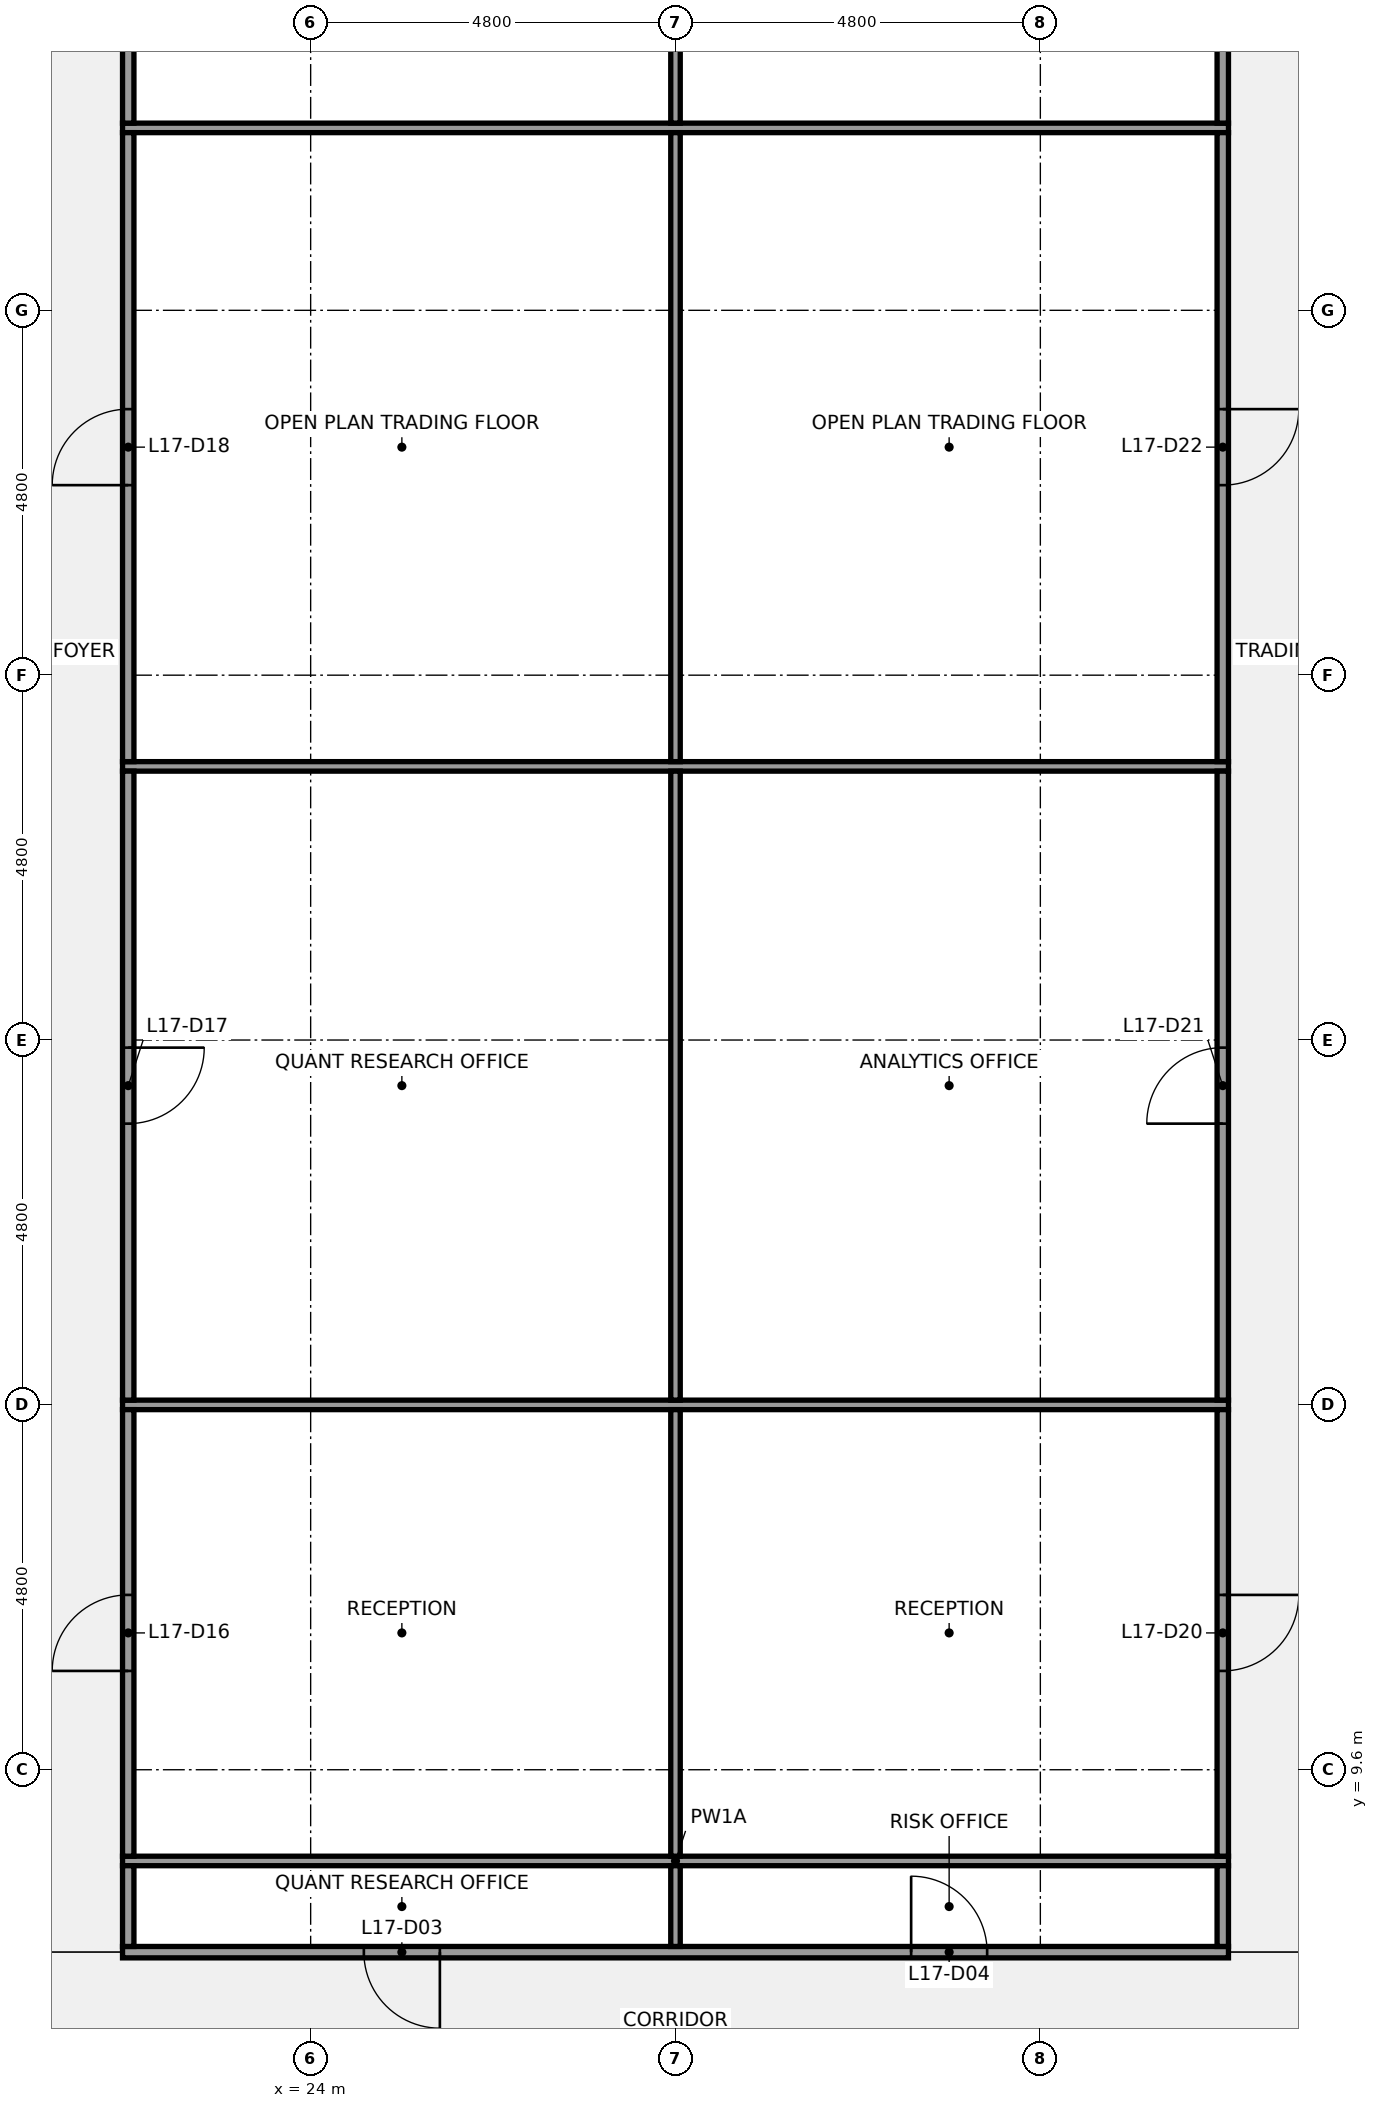
"""IFC4 building model, lengths in metres.
Left out: names, types, materials, properties, quantities, classifications, styles, units other than length and angle.
Written with IfcOpenShell. Run it as: python <this file> out.ifc"""

import sys

from ifc_helpers import new_model, si_unit, direction, frame, frame_2d, origin, place, context, subcontext, project, spatial, rectangle, extrude, element, fill, save


model = new_model("IFC4")
c1 = context("Model", 3, precision=1e-05, world=origin(), true_north=direction((0.0, 1.0)))
c2 = subcontext(c1, "Body", "Model", "MODEL_VIEW")
j1 = project(units=[si_unit("LENGTHUNIT", "METRE"), si_unit("PLANEANGLEUNIT", "RADIAN")], contexts=[c1])
p1 = place(None, origin())
s1 = spatial("IfcSite", under=j1, at=p1, CompositionType="ELEMENT")
p2 = place(p1, origin())
s2 = spatial("IfcBuilding", under=s1, at=p2, CompositionType="ELEMENT")
p3 = place(p2, frame((0.0, 0.0, 79.0)))
s3 = spatial("IfcBuildingStorey", under=s2, at=p3, CompositionType="ELEMENT", Elevation=79.0)
p4 = place(p3, frame((21.525, 7.2, 0.0), z_axis=(0.0, 0.0, 1.0), x_axis=(1.0, 0.0, 0.0)))
e1 = element("IfcWall", 1, at=p4, inside=s3, PredefinedType="PARTITIONING", context=c2, shape_type="SweptSolid", body=[
    extrude(rectangle(XDim=14.55, YDim=0.15, at=frame_2d((7.275, 0.0))), origin(), (0.0, 0.0, 1.0), 2.849),
])
p5 = place(p4, frame((3.175, 0.0, 0.0)))
e2 = element("IfcOpeningElement", 2, at=p5, cuts=e1, PredefinedType="OPENING", context=c2, shape_type="SweptSolid", body=[
    extrude(rectangle(XDim=1.0, YDim=2.1, at=frame_2d((0.5, 1.05))), frame((0.0, 0.085, 0.0), z_axis=(0.0, -1.0, 0.0), x_axis=(1.0, 0.0, 0.0)), (0.0, 0.0, 1.0), 0.17),
])
p6 = place(p4, frame((10.375, 0.0, 0.0)))
e3 = element("IfcOpeningElement", 3, at=p6, cuts=e1, PredefinedType="OPENING", context=c2, shape_type="SweptSolid", body=[
    extrude(rectangle(XDim=1.0, YDim=2.1, at=frame_2d((0.5, 1.05))), frame((0.0, 0.085, 0.0), z_axis=(0.0, -1.0, 0.0), x_axis=(1.0, 0.0, 0.0)), (0.0, 0.0, 1.0), 0.17),
])
for number, where, z_axis, x_axis in (
    (4, (21.525, 8.4, 0.0), (0.0, 0.0, 1.0), (1.0, 0.0, 0.0)),
    (5, (21.525, 14.4, 0.0), (0.0, 0.0, 1.0), (1.0, 0.0, 0.0)),
    (6, (21.525, 22.8, 0.0), (0.0, 0.0, 1.0), (1.0, 0.0, 0.0)),
    (7, (21.525, 31.2, 0.0), (0.0, 0.0, 1.0), (1.0, 0.0, 0.0)),
):
    element("IfcWall", number, at=place(p3, frame(where, z_axis=z_axis, x_axis=x_axis)), inside=s3, PredefinedType="PARTITIONING", context=c2, shape_type="SweptSolid", body=[
        extrude(rectangle(XDim=14.55, YDim=0.125, at=frame_2d((7.275, 0.0))), origin(), (0.0, 0.0, 1.0), 2.849),
    ])
p7 = place(p3, frame((21.6, 7.275, 0.0), z_axis=(0.0, 0.0, 1.0), x_axis=(0.0, 1.0, 0.0)))
e8 = element("IfcWall", 8, at=p7, inside=s3, PredefinedType="PARTITIONING", context=c2, shape_type="SweptSolid", body=[
    extrude(rectangle(XDim=1.062, YDim=0.15, at=frame_2d((0.531, 0.0))), origin(), (0.0, 0.0, 1.0), 2.849),
])
p8 = place(p3, frame((21.6, 8.462, 0.0), z_axis=(0.0, 0.0, 1.0), x_axis=(0.0, 1.0, 0.0)))
e9 = element("IfcWall", 9, at=p8, inside=s3, PredefinedType="PARTITIONING", context=c2, shape_type="SweptSolid", body=[
    extrude(rectangle(XDim=5.875, YDim=0.15, at=frame_2d((2.938, 0.0))), origin(), (0.0, 0.0, 1.0), 2.849),
])
p9 = place(p8, frame((2.438, 0.0, 0.0)))
e10 = element("IfcOpeningElement", 10, at=p9, cuts=e9, PredefinedType="OPENING", context=c2, shape_type="SweptSolid", body=[
    extrude(rectangle(XDim=1.0, YDim=2.1, at=frame_2d((0.5, 1.05))), frame((0.0, 0.085, 0.0), z_axis=(0.0, -1.0, 0.0), x_axis=(1.0, 0.0, 0.0)), (0.0, 0.0, 1.0), 0.17),
])
p10 = place(p3, frame((21.6, 14.462, 0.0), z_axis=(0.0, 0.0, 1.0), x_axis=(0.0, 1.0, 0.0)))
e11 = element("IfcWall", 11, at=p10, inside=s3, PredefinedType="PARTITIONING", context=c2, shape_type="SweptSolid", body=[
    extrude(rectangle(XDim=8.275, YDim=0.15, at=frame_2d((4.138, 0.0))), origin(), (0.0, 0.0, 1.0), 2.849),
])
p11 = place(p10, frame((3.637, 0.0, 0.0)))
e12 = element("IfcOpeningElement", 12, at=p11, cuts=e11, PredefinedType="OPENING", context=c2, shape_type="SweptSolid", body=[
    extrude(rectangle(XDim=1.0, YDim=2.1, at=frame_2d((0.5, 1.05))), frame((0.0, 0.085, 0.0), z_axis=(0.0, -1.0, 0.0), x_axis=(1.0, 0.0, 0.0)), (0.0, 0.0, 1.0), 0.17),
])
p12 = place(p3, frame((21.6, 22.863, 0.0), z_axis=(0.0, 0.0, 1.0), x_axis=(0.0, 1.0, 0.0)))
e13 = element("IfcWall", 13, at=p12, inside=s3, PredefinedType="PARTITIONING", context=c2, shape_type="SweptSolid", body=[
    extrude(rectangle(XDim=8.275, YDim=0.15, at=frame_2d((4.137, 0.0))), origin(), (0.0, 0.0, 1.0), 2.849),
])
p13 = place(p12, frame((3.637, 0.0, 0.0)))
e14 = element("IfcOpeningElement", 14, at=p13, cuts=e13, PredefinedType="OPENING", context=c2, shape_type="SweptSolid", body=[
    extrude(rectangle(XDim=1.0, YDim=2.1, at=frame_2d((0.5, 1.05))), frame((0.0, 0.085, 0.0), z_axis=(0.0, -1.0, 0.0), x_axis=(1.0, 0.0, 0.0)), (0.0, 0.0, 1.0), 0.17),
])
p14 = place(p3, frame((21.6, 31.262, 0.0), z_axis=(0.0, 0.0, 1.0), x_axis=(0.0, 1.0, 0.0)))
e15 = element("IfcWall", 15, at=p14, inside=s3, PredefinedType="PARTITIONING", context=c2, shape_type="SweptSolid", body=[
    extrude(rectangle(XDim=3.475, YDim=0.15, at=frame_2d((1.738, 0.0))), origin(), (0.0, 0.0, 1.0), 2.849),
])
p15 = place(p14, frame((1.238, 0.0, 0.0)))
e16 = element("IfcOpeningElement", 16, at=p15, cuts=e15, PredefinedType="OPENING", context=c2, shape_type="SweptSolid", body=[
    extrude(rectangle(XDim=1.0, YDim=2.1, at=frame_2d((0.5, 1.05))), frame((0.0, 0.085, 0.0), z_axis=(0.0, -1.0, 0.0), x_axis=(1.0, 0.0, 0.0)), (0.0, 0.0, 1.0), 0.17),
])
p16 = place(p3, frame((28.8, 7.275, 0.0), z_axis=(0.0, 0.0, 1.0), x_axis=(0.0, 1.0, 0.0)))
e17 = element("IfcWall", 17, at=p16, inside=s3, PredefinedType="PARTITIONING", context=c2, shape_type="SweptSolid", body=[
    extrude(rectangle(XDim=1.062, YDim=0.125, at=frame_2d((0.531, 0.0))), origin(), (0.0, 0.0, 1.0), 2.849),
])
p17 = place(p3, frame((28.8, 8.462, 0.0), z_axis=(0.0, 0.0, 1.0), x_axis=(0.0, 1.0, 0.0)))
e18 = element("IfcWall", 18, at=p17, inside=s3, PredefinedType="PARTITIONING", context=c2, shape_type="SweptSolid", body=[
    extrude(rectangle(XDim=5.875, YDim=0.125, at=frame_2d((2.938, 0.0))), origin(), (0.0, 0.0, 1.0), 2.849),
])
p18 = place(p3, frame((28.8, 14.462, 0.0), z_axis=(0.0, 0.0, 1.0), x_axis=(0.0, 1.0, 0.0)))
e19 = element("IfcWall", 19, at=p18, inside=s3, PredefinedType="PARTITIONING", context=c2, shape_type="SweptSolid", body=[
    extrude(rectangle(XDim=8.275, YDim=0.125, at=frame_2d((4.138, 0.0))), origin(), (0.0, 0.0, 1.0), 2.849),
])
p19 = place(p3, frame((28.8, 22.863, 0.0), z_axis=(0.0, 0.0, 1.0), x_axis=(0.0, 1.0, 0.0)))
e20 = element("IfcWall", 20, at=p19, inside=s3, PredefinedType="PARTITIONING", context=c2, shape_type="SweptSolid", body=[
    extrude(rectangle(XDim=8.275, YDim=0.125, at=frame_2d((4.137, 0.0))), origin(), (0.0, 0.0, 1.0), 2.849),
])
p20 = place(p3, frame((28.8, 31.262, 0.0), z_axis=(0.0, 0.0, 1.0), x_axis=(0.0, 1.0, 0.0)))
e21 = element("IfcWall", 21, at=p20, inside=s3, PredefinedType="PARTITIONING", context=c2, shape_type="SweptSolid", body=[
    extrude(rectangle(XDim=3.475, YDim=0.125, at=frame_2d((1.738, 0.0))), origin(), (0.0, 0.0, 1.0), 2.849),
])
p21 = place(p3, frame((36.0, 7.275, 0.0), z_axis=(0.0, 0.0, 1.0), x_axis=(0.0, 1.0, 0.0)))
e22 = element("IfcWall", 22, at=p21, inside=s3, PredefinedType="PARTITIONING", context=c2, shape_type="SweptSolid", body=[
    extrude(rectangle(XDim=1.062, YDim=0.15, at=frame_2d((0.531, 0.0))), origin(), (0.0, 0.0, 1.0), 2.849),
])
p22 = place(p3, frame((36.0, 8.462, 0.0), z_axis=(0.0, 0.0, 1.0), x_axis=(0.0, 1.0, 0.0)))
e23 = element("IfcWall", 23, at=p22, inside=s3, PredefinedType="PARTITIONING", context=c2, shape_type="SweptSolid", body=[
    extrude(rectangle(XDim=5.875, YDim=0.15, at=frame_2d((2.938, 0.0))), origin(), (0.0, 0.0, 1.0), 2.849),
])
p23 = place(p22, frame((2.438, 0.0, 0.0)))
e24 = element("IfcOpeningElement", 24, at=p23, cuts=e23, PredefinedType="OPENING", context=c2, shape_type="SweptSolid", body=[
    extrude(rectangle(XDim=1.0, YDim=2.1, at=frame_2d((0.5, 1.05))), frame((0.0, 0.085, 0.0), z_axis=(0.0, -1.0, 0.0), x_axis=(1.0, 0.0, 0.0)), (0.0, 0.0, 1.0), 0.17),
])
p24 = place(p3, frame((36.0, 14.462, 0.0), z_axis=(0.0, 0.0, 1.0), x_axis=(0.0, 1.0, 0.0)))
e25 = element("IfcWall", 25, at=p24, inside=s3, PredefinedType="PARTITIONING", context=c2, shape_type="SweptSolid", body=[
    extrude(rectangle(XDim=8.275, YDim=0.15, at=frame_2d((4.138, 0.0))), origin(), (0.0, 0.0, 1.0), 2.849),
])
p25 = place(p24, frame((3.637, 0.0, 0.0)))
e26 = element("IfcOpeningElement", 26, at=p25, cuts=e25, PredefinedType="OPENING", context=c2, shape_type="SweptSolid", body=[
    extrude(rectangle(XDim=1.0, YDim=2.1, at=frame_2d((0.5, 1.05))), frame((0.0, 0.085, 0.0), z_axis=(0.0, -1.0, 0.0), x_axis=(1.0, 0.0, 0.0)), (0.0, 0.0, 1.0), 0.17),
])
p26 = place(p3, frame((36.0, 22.863, 0.0), z_axis=(0.0, 0.0, 1.0), x_axis=(0.0, 1.0, 0.0)))
e27 = element("IfcWall", 27, at=p26, inside=s3, PredefinedType="PARTITIONING", context=c2, shape_type="SweptSolid", body=[
    extrude(rectangle(XDim=8.275, YDim=0.15, at=frame_2d((4.137, 0.0))), origin(), (0.0, 0.0, 1.0), 2.849),
])
p27 = place(p26, frame((3.637, 0.0, 0.0)))
e28 = element("IfcOpeningElement", 28, at=p27, cuts=e27, PredefinedType="OPENING", context=c2, shape_type="SweptSolid", body=[
    extrude(rectangle(XDim=1.0, YDim=2.1, at=frame_2d((0.5, 1.05))), frame((0.0, 0.085, 0.0), z_axis=(0.0, -1.0, 0.0), x_axis=(1.0, 0.0, 0.0)), (0.0, 0.0, 1.0), 0.17),
])
p28 = place(p3, frame((36.0, 31.262, 0.0), z_axis=(0.0, 0.0, 1.0), x_axis=(0.0, 1.0, 0.0)))
e29 = element("IfcWall", 29, at=p28, inside=s3, PredefinedType="PARTITIONING", context=c2, shape_type="SweptSolid", body=[
    extrude(rectangle(XDim=3.475, YDim=0.15, at=frame_2d((1.738, 0.0))), origin(), (0.0, 0.0, 1.0), 2.849),
])
p29 = place(p28, frame((1.238, 0.0, 0.0)))
e30 = element("IfcOpeningElement", 30, at=p29, cuts=e29, PredefinedType="OPENING", context=c2, shape_type="SweptSolid", body=[
    extrude(rectangle(XDim=1.0, YDim=2.1, at=frame_2d((0.5, 1.05))), frame((0.0, 0.085, 0.0), z_axis=(0.0, -1.0, 0.0), x_axis=(1.0, 0.0, 0.0)), (0.0, 0.0, 1.0), 0.17),
])
p30 = place(p5, origin())
e31 = element("IfcDoor", 31, at=p30, inside=s3, OperationType="SINGLE_SWING_RIGHT", PredefinedType="DOOR", context=c2, shape_type="SweptSolid", body=[
    extrude(rectangle(XDim=1.0, YDim=2.1, at=frame_2d((0.5, 1.05))), frame((0.0, 0.025, 0.0), z_axis=(0.0, -1.0, 0.0), x_axis=(1.0, 0.0, 0.0)), (0.0, 0.0, 1.0), 0.05),
])
fill(e2, e31)
p31 = place(p6, origin())
e32 = element("IfcDoor", 32, at=p31, inside=s3, OperationType="SINGLE_SWING_LEFT", PredefinedType="DOOR", context=c2, shape_type="SweptSolid", body=[
    extrude(rectangle(XDim=1.0, YDim=2.1, at=frame_2d((0.5, 1.05))), frame((0.0, 0.025, 0.0), z_axis=(0.0, -1.0, 0.0), x_axis=(1.0, 0.0, 0.0)), (0.0, 0.0, 1.0), 0.05),
])
fill(e3, e32)
p32 = place(p9, origin())
e33 = element("IfcDoor", 33, at=p32, inside=s3, OperationType="SINGLE_SWING_LEFT", PredefinedType="DOOR", context=c2, shape_type="SweptSolid", body=[
    extrude(rectangle(XDim=1.0, YDim=2.1, at=frame_2d((0.5, 1.05))), frame((0.0, 0.025, 0.0), z_axis=(0.0, -1.0, 0.0), x_axis=(1.0, 0.0, 0.0)), (0.0, 0.0, 1.0), 0.05),
])
fill(e10, e33)
p33 = place(p11, origin())
e34 = element("IfcDoor", 34, at=p33, inside=s3, OperationType="SINGLE_SWING_RIGHT", PredefinedType="DOOR", context=c2, shape_type="SweptSolid", body=[
    extrude(rectangle(XDim=1.0, YDim=2.1, at=frame_2d((0.5, 1.05))), frame((0.0, 0.025, 0.0), z_axis=(0.0, -1.0, 0.0), x_axis=(1.0, 0.0, 0.0)), (0.0, 0.0, 1.0), 0.05),
])
fill(e12, e34)
p34 = place(p13, origin())
e35 = element("IfcDoor", 35, at=p34, inside=s3, OperationType="SINGLE_SWING_LEFT", PredefinedType="DOOR", context=c2, shape_type="SweptSolid", body=[
    extrude(rectangle(XDim=1.0, YDim=2.1, at=frame_2d((0.5, 1.05))), frame((0.0, 0.025, 0.0), z_axis=(0.0, -1.0, 0.0), x_axis=(1.0, 0.0, 0.0)), (0.0, 0.0, 1.0), 0.05),
])
fill(e14, e35)
p35 = place(p23, origin())
e36 = element("IfcDoor", 36, at=p35, inside=s3, OperationType="SINGLE_SWING_RIGHT", PredefinedType="DOOR", context=c2, shape_type="SweptSolid", body=[
    extrude(rectangle(XDim=1.0, YDim=2.1, at=frame_2d((0.5, 1.05))), frame((0.0, 0.025, 0.0), z_axis=(0.0, -1.0, 0.0), x_axis=(1.0, 0.0, 0.0)), (0.0, 0.0, 1.0), 0.05),
])
fill(e24, e36)
p36 = place(p25, origin())
e37 = element("IfcDoor", 37, at=p36, inside=s3, OperationType="SINGLE_SWING_LEFT", PredefinedType="DOOR", context=c2, shape_type="SweptSolid", body=[
    extrude(rectangle(XDim=1.0, YDim=2.1, at=frame_2d((0.5, 1.05))), frame((0.0, 0.025, 0.0), z_axis=(0.0, -1.0, 0.0), x_axis=(1.0, 0.0, 0.0)), (0.0, 0.0, 1.0), 0.05),
])
fill(e26, e37)
p37 = place(p27, origin())
e38 = element("IfcDoor", 38, at=p37, inside=s3, OperationType="SINGLE_SWING_RIGHT", PredefinedType="DOOR", context=c2, shape_type="SweptSolid", body=[
    extrude(rectangle(XDim=1.0, YDim=2.1, at=frame_2d((0.5, 1.05))), frame((0.0, 0.025, 0.0), z_axis=(0.0, -1.0, 0.0), x_axis=(1.0, 0.0, 0.0)), (0.0, 0.0, 1.0), 0.05),
])
fill(e28, e38)
save(model, sys.argv[1])
